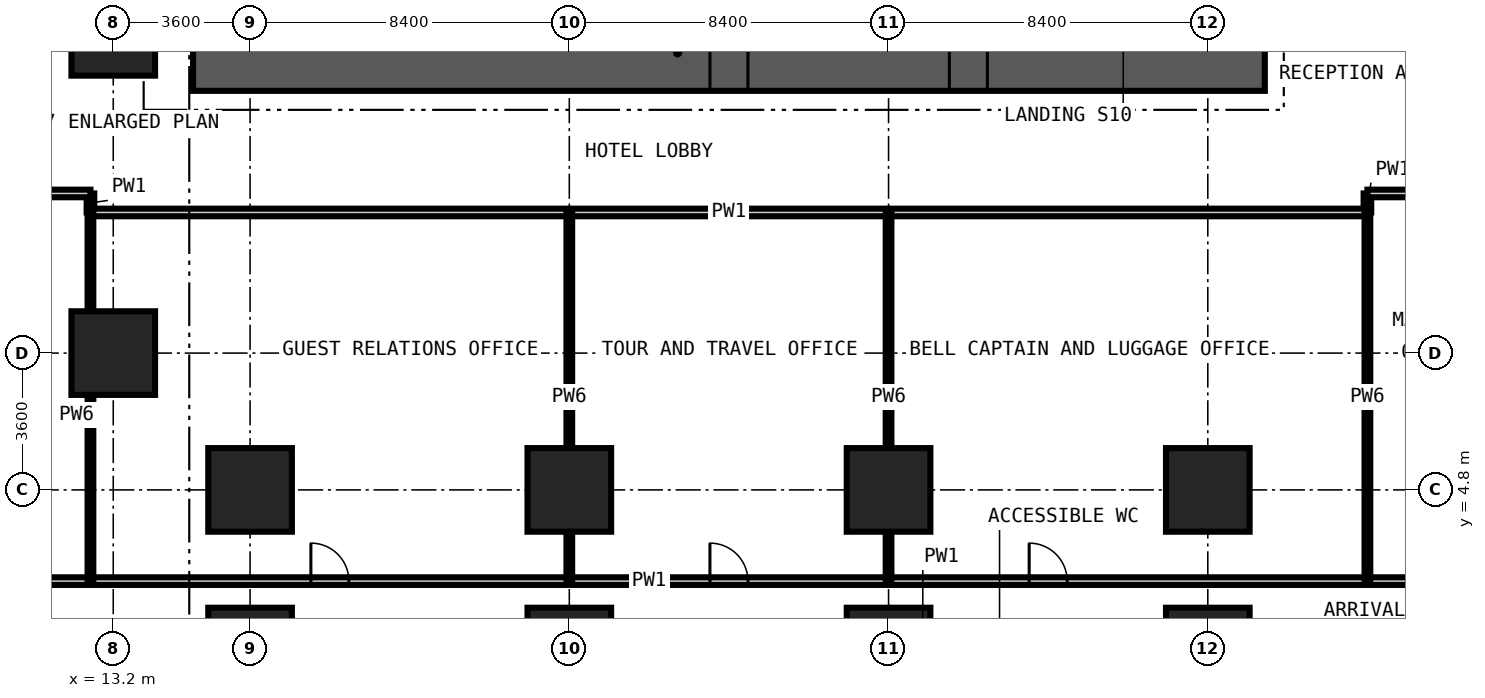
"""IFC4 building model, lengths in metres.
Left out: names, types, materials, properties, quantities, classifications, styles, units other than length and angle.
Written with IfcOpenShell. Run it as: python <this file> out.ifc"""

import sys

from ifc_helpers import new_model, si_unit, direction, frame, frame_2d, origin, origin_2d, place, context, subcontext, project, spatial, rectangle, extrude, element, fill, save


model = new_model("IFC4")
c1 = context("Model", 3, precision=1e-05, world=origin(), true_north=direction((0.0, 1.0)))
c2 = subcontext(c1, "Body", "Model", "MODEL_VIEW")
j1 = project(units=[si_unit("LENGTHUNIT", "METRE"), si_unit("PLANEANGLEUNIT", "RADIAN")], contexts=[c1])
p1 = place(None, origin())
s1 = spatial("IfcSite", under=j1, at=p1, CompositionType="ELEMENT")
p2 = place(p1, origin())
s2 = spatial("IfcBuilding", under=s1, at=p2, CompositionType="ELEMENT")
p3 = place(p2, origin())
s3 = spatial("IfcBuildingStorey", under=s2, at=p3, CompositionType="ELEMENT", Elevation=0.0)
for number, where, z_axis, x_axis in (
    (1, (13.2, 8.4, -0.3), (0.0, 0.0, 1.0), (1.0, 0.0, 0.0)),
    (2, (13.2, 16.8, -0.3), (0.0, 0.0, 1.0), (1.0, 0.0, 0.0)),
    (3, (16.8, 0.6, -0.3), (0.0, 0.0, 1.0), (1.0, 0.0, 0.0)),
    (4, (16.8, 4.8, -0.3), (0.0, 0.0, 1.0), (1.0, 0.0, 0.0)),
    (5, (25.2, 0.6, -0.3), (0.0, 0.0, 1.0), (1.0, 0.0, 0.0)),
    (6, (25.2, 4.8, -0.3), (0.0, 0.0, 1.0), (1.0, 0.0, 0.0)),
    (7, (33.6, 0.6, -0.3), (0.0, 0.0, 1.0), (1.0, 0.0, 0.0)),
    (8, (33.6, 4.8, -0.3), (0.0, 0.0, 1.0), (1.0, 0.0, 0.0)),
    (9, (42.0, 0.6, -0.3), (0.0, 0.0, 1.0), (1.0, 0.0, 0.0)),
    (10, (42.0, 4.8, -0.3), (0.0, 0.0, 1.0), (1.0, 0.0, 0.0)),
):
    element("IfcColumn", number, at=place(p3, frame(where, z_axis=z_axis, x_axis=x_axis)), inside=s3, PredefinedType="COLUMN", context=c2, shape_type="SweptSolid", body=[
        extrude(rectangle(XDim=2.2, YDim=2.2, at=origin_2d()), origin(), (0.0, 0.0, 1.0), 6.0),
    ])
p4 = place(p3, frame((15.3, 16.3, -0.3), z_axis=(0.0, 0.0, 1.0), x_axis=(1.0, 0.0, 0.0)))
e11 = element("IfcWall", 11, at=p4, inside=s3, PredefinedType="SHEAR", context=c2, shape_type="SweptSolid", body=[
    extrude(rectangle(XDim=28.2, YDim=2.0, at=frame_2d((14.1, 0.0))), origin(), (0.0, 0.0, 1.0), 6.0),
])
p5 = place(p4, frame((13.6, 0.0, 0.3)))
e12 = element("IfcOpeningElement", 12, at=p5, cuts=e11, PredefinedType="OPENING", context=c2, shape_type="SweptSolid", body=[
    extrude(rectangle(XDim=1.0, YDim=2.1, at=frame_2d((0.5, 1.05))), frame((0.0, 1.01, 0.0), z_axis=(0.0, -1.0, 0.0), x_axis=(1.0, 0.0, 0.0)), (0.0, 0.0, 1.0), 2.02),
])
p6 = place(p4, frame((19.9, 0.0, 0.3)))
e13 = element("IfcOpeningElement", 13, at=p6, cuts=e11, PredefinedType="OPENING", context=c2, shape_type="SweptSolid", body=[
    extrude(rectangle(XDim=1.0, YDim=2.1, at=frame_2d((0.5, 1.05))), frame((0.0, 1.01, 0.0), z_axis=(0.0, -1.0, 0.0), x_axis=(1.0, 0.0, 0.0)), (0.0, 0.0, 1.0), 2.02),
])
for number, where, z_axis, x_axis in (
    (14, (12.6, 12.1, 0.0), (0.0, 0.0, 1.0), (0.0, 1.0, 0.0)),
    (15, (46.2, 12.1, 0.0), (0.0, 0.0, 1.0), (0.0, 1.0, 0.0)),
):
    element("IfcWall", number, at=place(p3, frame(where, z_axis=z_axis, x_axis=x_axis)), inside=s3, PredefinedType="PARTITIONING", context=c2, shape_type="SweptSolid", body=[
        extrude(rectangle(XDim=0.5, YDim=0.2, at=frame_2d((0.25, 0.0))), origin(), (0.0, 0.0, 1.0), 5.7),
    ])
p7 = place(p3, frame((0.0, 2.4, 0.0), z_axis=(0.0, 0.0, 1.0), x_axis=(1.0, 0.0, 0.0)))
e16 = element("IfcWall", 16, at=p7, inside=s3, PredefinedType="PARTITIONING", context=c2, shape_type="SweptSolid", body=[
    extrude(rectangle(XDim=54.6, YDim=0.2, at=frame_2d((27.3, 0.0))), origin(), (0.0, 0.0, 1.0), 5.7),
])
p8 = place(p7, frame((5.8, 0.0, 0.0)))
e17 = element("IfcOpeningElement", 17, at=p8, cuts=e16, PredefinedType="OPENING", context=c2, shape_type="SweptSolid", body=[
    extrude(rectangle(XDim=1.0, YDim=2.1, at=frame_2d((0.5, 1.05))), frame((0.0, 0.11, 0.0), z_axis=(0.0, -1.0, 0.0), x_axis=(1.0, 0.0, 0.0)), (0.0, 0.0, 1.0), 0.22),
])
p9 = place(p7, frame((18.4, 0.0, 0.0)))
e18 = element("IfcOpeningElement", 18, at=p9, cuts=e16, PredefinedType="OPENING", context=c2, shape_type="SweptSolid", body=[
    extrude(rectangle(XDim=1.0, YDim=2.1, at=frame_2d((0.5, 1.05))), frame((0.0, 0.11, 0.0), z_axis=(0.0, -1.0, 0.0), x_axis=(1.0, 0.0, 0.0)), (0.0, 0.0, 1.0), 0.22),
])
p10 = place(p7, frame((28.9, 0.0, 0.0)))
e19 = element("IfcOpeningElement", 19, at=p10, cuts=e16, PredefinedType="OPENING", context=c2, shape_type="SweptSolid", body=[
    extrude(rectangle(XDim=1.0, YDim=2.1, at=frame_2d((0.5, 1.05))), frame((0.0, 0.11, 0.0), z_axis=(0.0, -1.0, 0.0), x_axis=(1.0, 0.0, 0.0)), (0.0, 0.0, 1.0), 0.22),
])
p11 = place(p7, frame((37.3, 0.0, 0.0)))
e20 = element("IfcOpeningElement", 20, at=p11, cuts=e16, PredefinedType="OPENING", context=c2, shape_type="SweptSolid", body=[
    extrude(rectangle(XDim=1.0, YDim=2.1, at=frame_2d((0.5, 1.05))), frame((0.0, 0.11, 0.0), z_axis=(0.0, -1.0, 0.0), x_axis=(1.0, 0.0, 0.0)), (0.0, 0.0, 1.0), 0.22),
])
p12 = place(p3, frame((12.6, 12.1, 0.0), z_axis=(0.0, 0.0, 1.0), x_axis=(1.0, 0.0, 0.0)))
e21 = element("IfcWall", 21, at=p12, inside=s3, PredefinedType="PARTITIONING", context=c2, shape_type="SweptSolid", body=[
    extrude(rectangle(XDim=33.6, YDim=0.2, at=frame_2d((16.8, 0.0))), origin(), (0.0, 0.0, 1.0), 5.7),
])
p13 = place(p3, frame((7.9, 12.6, 0.0), z_axis=(0.0, 0.0, 1.0), x_axis=(1.0, 0.0, 0.0)))
e22 = element("IfcWall", 22, at=p13, inside=s3, PredefinedType="PARTITIONING", context=c2, shape_type="SweptSolid", body=[
    extrude(rectangle(XDim=4.7, YDim=0.2, at=frame_2d((2.35, 0.0))), origin(), (0.0, 0.0, 1.0), 5.7),
])
p14 = place(p3, frame((46.2, 12.6, 0.0), z_axis=(0.0, 0.0, 1.0), x_axis=(1.0, 0.0, 0.0)))
e23 = element("IfcWall", 23, at=p14, inside=s3, PredefinedType="PARTITIONING", context=c2, shape_type="SweptSolid", body=[
    extrude(rectangle(XDim=8.4, YDim=0.2, at=frame_2d((4.2, 0.0))), origin(), (0.0, 0.0, 1.0), 5.7),
])
p15 = place(p14, frame((1.6, 0.0, 0.0)))
e24 = element("IfcOpeningElement", 24, at=p15, cuts=e23, PredefinedType="OPENING", context=c2, shape_type="SweptSolid", body=[
    extrude(rectangle(XDim=1.0, YDim=2.1, at=frame_2d((0.5, 1.05))), frame((0.0, 0.11, 0.0), z_axis=(0.0, -1.0, 0.0), x_axis=(1.0, 0.0, 0.0)), (0.0, 0.0, 1.0), 0.22),
])
for number, where, z_axis, x_axis in (
    (25, (12.6, 2.4, 0.0), (0.0, 0.0, 1.0), (0.0, 1.0, 0.0)),
    (26, (25.2, 2.4, 0.0), (0.0, 0.0, 1.0), (0.0, 1.0, 0.0)),
    (27, (33.6, 2.4, 0.0), (0.0, 0.0, 1.0), (0.0, 1.0, 0.0)),
    (28, (46.2, 2.4, 0.0), (0.0, 0.0, 1.0), (0.0, 1.0, 0.0)),
):
    element("IfcWall", number, at=place(p3, frame(where, z_axis=z_axis, x_axis=x_axis)), inside=s3, PredefinedType="PARTITIONING", context=c2, shape_type="SweptSolid", body=[
        extrude(rectangle(XDim=9.7, YDim=0.15, at=frame_2d((4.85, 0.0))), origin(), (0.0, 0.0, 1.0), 5.7),
    ])
p16 = place(p5, origin())
e29 = element("IfcDoor", 29, at=p16, inside=s3, OperationType="SINGLE_SWING_RIGHT", PredefinedType="DOOR", context=c2, shape_type="SweptSolid", body=[
    extrude(rectangle(XDim=1.0, YDim=2.1, at=frame_2d((0.5, 1.05))), frame((0.0, 0.025, 0.0), z_axis=(0.0, -1.0, 0.0), x_axis=(1.0, 0.0, 0.0)), (0.0, 0.0, 1.0), 0.05),
])
fill(e12, e29)
p17 = place(p6, origin())
e30 = element("IfcDoor", 30, at=p17, inside=s3, OperationType="SINGLE_SWING_RIGHT", PredefinedType="DOOR", context=c2, shape_type="SweptSolid", body=[
    extrude(rectangle(XDim=1.0, YDim=2.1, at=frame_2d((0.5, 1.05))), frame((0.0, 0.025, 0.0), z_axis=(0.0, -1.0, 0.0), x_axis=(1.0, 0.0, 0.0)), (0.0, 0.0, 1.0), 0.05),
])
fill(e13, e30)
p18 = place(p9, origin())
e31 = element("IfcDoor", 31, at=p18, inside=s3, OperationType="SINGLE_SWING_LEFT", PredefinedType="DOOR", context=c2, shape_type="SweptSolid", body=[
    extrude(rectangle(XDim=1.0, YDim=2.1, at=frame_2d((0.5, 1.05))), frame((0.0, 0.025, 0.0), z_axis=(0.0, -1.0, 0.0), x_axis=(1.0, 0.0, 0.0)), (0.0, 0.0, 1.0), 0.05),
])
fill(e18, e31)
p19 = place(p10, origin())
e32 = element("IfcDoor", 32, at=p19, inside=s3, OperationType="SINGLE_SWING_LEFT", PredefinedType="DOOR", context=c2, shape_type="SweptSolid", body=[
    extrude(rectangle(XDim=1.0, YDim=2.1, at=frame_2d((0.5, 1.05))), frame((0.0, 0.025, 0.0), z_axis=(0.0, -1.0, 0.0), x_axis=(1.0, 0.0, 0.0)), (0.0, 0.0, 1.0), 0.05),
])
fill(e19, e32)
p20 = place(p11, origin())
e33 = element("IfcDoor", 33, at=p20, inside=s3, OperationType="SINGLE_SWING_LEFT", PredefinedType="DOOR", context=c2, shape_type="SweptSolid", body=[
    extrude(rectangle(XDim=1.0, YDim=2.1, at=frame_2d((0.5, 1.05))), frame((0.0, 0.025, 0.0), z_axis=(0.0, -1.0, 0.0), x_axis=(1.0, 0.0, 0.0)), (0.0, 0.0, 1.0), 0.05),
])
fill(e20, e33)
save(model, sys.argv[1])
